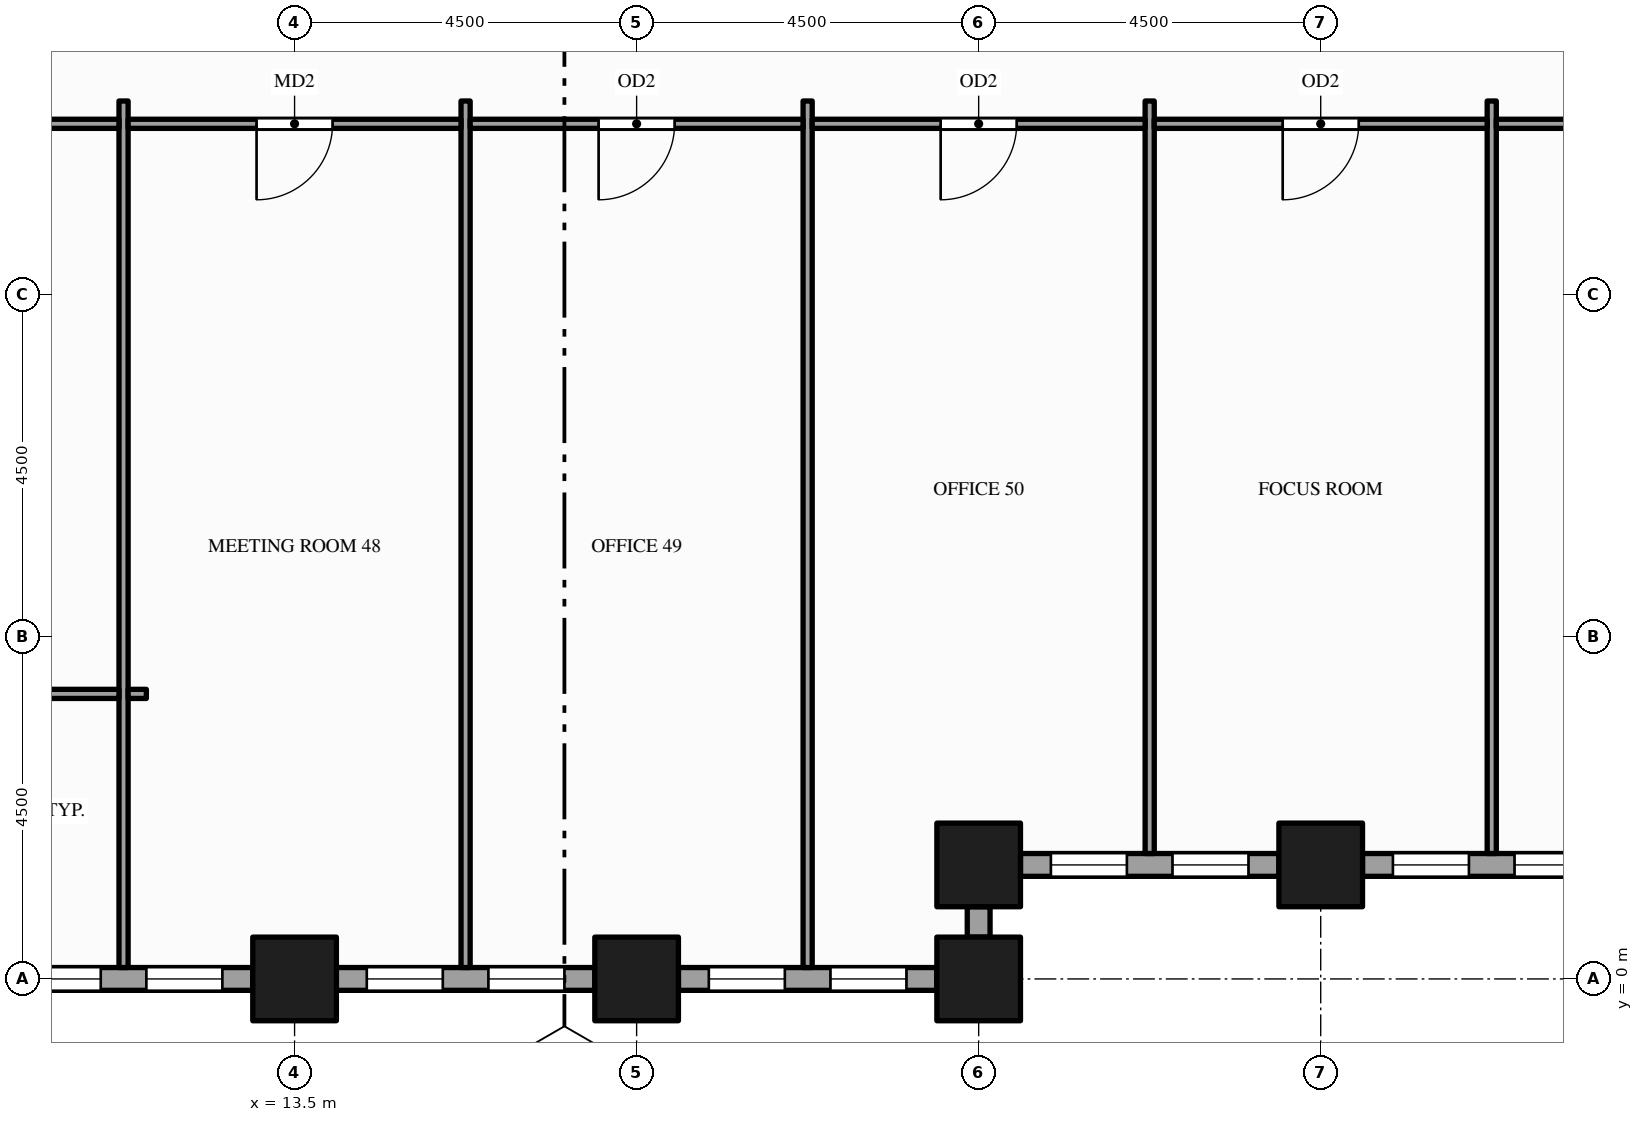
"""IFC4 building model, lengths in metres.
Left out: names, types, materials, properties, quantities, classifications, styles, units other than length and angle.
Written with IfcOpenShell. Run it as: python <this file> out.ifc"""

import sys

from ifc_helpers import new_model, si_unit, direction, frame, frame_2d, origin, origin_2d, place, context, subcontext, project, spatial, rectangle, hollow_rectangle, extrude, element, fill, save


model = new_model("IFC4")
c1 = context("Model", 3, precision=1e-05, world=origin(), true_north=direction((0.0, 1.0)))
c2 = subcontext(c1, "Body", "Model", "MODEL_VIEW")
j1 = project(units=[si_unit("LENGTHUNIT", "METRE"), si_unit("PLANEANGLEUNIT", "RADIAN")], contexts=[c1])
p1 = place(None, origin())
s1 = spatial("IfcSite", under=j1, at=p1, CompositionType="ELEMENT")
p2 = place(p1, origin())
s2 = spatial("IfcBuilding", under=s1, at=p2, CompositionType="ELEMENT")
p3 = place(p2, frame((0.0, 0.0, 41.0)))
s3 = spatial("IfcBuildingStorey", under=s2, at=p3, CompositionType="ELEMENT", Elevation=41.0)
for number, where, z_axis, x_axis in (
    (1, (13.5, 0.0, -0.15), (0.0, 0.0, 1.0), (1.0, 0.0, 0.0)),
    (2, (18.0, 0.0, -0.15), (0.0, 0.0, 1.0), (1.0, 0.0, 0.0)),
    (3, (22.5, 0.0, -0.15), (0.0, 0.0, 1.0), (1.0, 0.0, 0.0)),
    (4, (22.5, 1.5, -0.15), (0.0, 0.0, 1.0), (1.0, 0.0, 0.0)),
    (5, (27.0, 1.5, -0.15), (0.0, 0.0, 1.0), (1.0, 0.0, 0.0)),
):
    element("IfcColumn", number, at=place(p3, frame(where, z_axis=z_axis, x_axis=x_axis)), inside=s3, PredefinedType="COLUMN", context=c2, shape_type="SweptSolid", body=[
        extrude(hollow_rectangle(XDim=1.1, YDim=1.1, WallThickness=0.06, at=origin_2d()), origin(), (0.0, 0.0, 1.0), 4.0),
    ])
p4 = place(p3, frame((9.55, 0.0, 0.0), z_axis=(0.0, 0.0, 1.0), x_axis=(1.0, 0.0, 0.0)))
e6 = element("IfcWall", 6, at=p4, inside=s3, PredefinedType="STANDARD", context=c2, shape_type="SweptSolid", body=[
    extrude(rectangle(XDim=3.4, YDim=0.3, at=frame_2d((1.7, 0.0))), origin(), (0.0, 0.0, 1.0), 3.144),
])
p5 = place(p4, frame((0.4, 0.0, 0.9)))
e7 = element("IfcOpeningElement", 7, at=p5, cuts=e6, PredefinedType="OPENING", context=c2, shape_type="SweptSolid", body=[
    extrude(rectangle(XDim=1.0, YDim=2.0, at=frame_2d((0.5, 1.0))), frame((0.0, 0.16, 0.0), z_axis=(0.0, -1.0, 0.0), x_axis=(1.0, 0.0, 0.0)), (0.0, 0.0, 1.0), 0.32),
])
p6 = place(p4, frame((2.0, 0.0, 0.9)))
e8 = element("IfcOpeningElement", 8, at=p6, cuts=e6, PredefinedType="OPENING", context=c2, shape_type="SweptSolid", body=[
    extrude(rectangle(XDim=1.0, YDim=2.0, at=frame_2d((0.5, 1.0))), frame((0.0, 0.16, 0.0), z_axis=(0.0, -1.0, 0.0), x_axis=(1.0, 0.0, 0.0)), (0.0, 0.0, 1.0), 0.32),
])
p7 = place(p3, frame((14.05, 0.0, 0.0), z_axis=(0.0, 0.0, 1.0), x_axis=(1.0, 0.0, 0.0)))
e9 = element("IfcWall", 9, at=p7, inside=s3, PredefinedType="STANDARD", context=c2, shape_type="SweptSolid", body=[
    extrude(rectangle(XDim=3.4, YDim=0.3, at=frame_2d((1.7, 0.0))), origin(), (0.0, 0.0, 1.0), 3.144),
])
p8 = place(p7, frame((0.4, 0.0, 0.9)))
e10 = element("IfcOpeningElement", 10, at=p8, cuts=e9, PredefinedType="OPENING", context=c2, shape_type="SweptSolid", body=[
    extrude(rectangle(XDim=1.0, YDim=2.0, at=frame_2d((0.5, 1.0))), frame((0.0, 0.16, 0.0), z_axis=(0.0, -1.0, 0.0), x_axis=(1.0, 0.0, 0.0)), (0.0, 0.0, 1.0), 0.32),
])
p9 = place(p7, frame((2.0, 0.0, 0.9)))
e11 = element("IfcOpeningElement", 11, at=p9, cuts=e9, PredefinedType="OPENING", context=c2, shape_type="SweptSolid", body=[
    extrude(rectangle(XDim=1.0, YDim=2.0, at=frame_2d((0.5, 1.0))), frame((0.0, 0.16, 0.0), z_axis=(0.0, -1.0, 0.0), x_axis=(1.0, 0.0, 0.0)), (0.0, 0.0, 1.0), 0.32),
])
p10 = place(p3, frame((18.55, 0.0, 0.0), z_axis=(0.0, 0.0, 1.0), x_axis=(1.0, 0.0, 0.0)))
e12 = element("IfcWall", 12, at=p10, inside=s3, PredefinedType="STANDARD", context=c2, shape_type="SweptSolid", body=[
    extrude(rectangle(XDim=3.4, YDim=0.3, at=frame_2d((1.7, 0.0))), origin(), (0.0, 0.0, 1.0), 3.144),
])
p11 = place(p10, frame((0.4, 0.0, 0.9)))
e13 = element("IfcOpeningElement", 13, at=p11, cuts=e12, PredefinedType="OPENING", context=c2, shape_type="SweptSolid", body=[
    extrude(rectangle(XDim=1.0, YDim=2.0, at=frame_2d((0.5, 1.0))), frame((0.0, 0.16, 0.0), z_axis=(0.0, -1.0, 0.0), x_axis=(1.0, 0.0, 0.0)), (0.0, 0.0, 1.0), 0.32),
])
p12 = place(p10, frame((2.0, 0.0, 0.9)))
e14 = element("IfcOpeningElement", 14, at=p12, cuts=e12, PredefinedType="OPENING", context=c2, shape_type="SweptSolid", body=[
    extrude(rectangle(XDim=1.0, YDim=2.0, at=frame_2d((0.5, 1.0))), frame((0.0, 0.16, 0.0), z_axis=(0.0, -1.0, 0.0), x_axis=(1.0, 0.0, 0.0)), (0.0, 0.0, 1.0), 0.32),
])
p13 = place(p3, frame((22.5, 0.55, 0.0), z_axis=(0.0, 0.0, 1.0), x_axis=(0.0, 1.0, 0.0)))
e15 = element("IfcWall", 15, at=p13, inside=s3, PredefinedType="STANDARD", context=c2, shape_type="SweptSolid", body=[
    extrude(rectangle(XDim=0.4, YDim=0.3, at=frame_2d((0.2, 0.0))), origin(), (0.0, 0.0, 1.0), 3.144),
])
p14 = place(p3, frame((23.05, 1.5, 0.0), z_axis=(0.0, 0.0, 1.0), x_axis=(1.0, 0.0, 0.0)))
e16 = element("IfcWall", 16, at=p14, inside=s3, PredefinedType="STANDARD", context=c2, shape_type="SweptSolid", body=[
    extrude(rectangle(XDim=3.4, YDim=0.3, at=frame_2d((1.7, 0.0))), origin(), (0.0, 0.0, 1.0), 3.144),
])
p15 = place(p14, frame((0.4, 0.0, 0.9)))
e17 = element("IfcOpeningElement", 17, at=p15, cuts=e16, PredefinedType="OPENING", context=c2, shape_type="SweptSolid", body=[
    extrude(rectangle(XDim=1.0, YDim=2.0, at=frame_2d((0.5, 1.0))), frame((0.0, 0.16, 0.0), z_axis=(0.0, -1.0, 0.0), x_axis=(1.0, 0.0, 0.0)), (0.0, 0.0, 1.0), 0.32),
])
p16 = place(p14, frame((2.0, 0.0, 0.9)))
e18 = element("IfcOpeningElement", 18, at=p16, cuts=e16, PredefinedType="OPENING", context=c2, shape_type="SweptSolid", body=[
    extrude(rectangle(XDim=1.0, YDim=2.0, at=frame_2d((0.5, 1.0))), frame((0.0, 0.16, 0.0), z_axis=(0.0, -1.0, 0.0), x_axis=(1.0, 0.0, 0.0)), (0.0, 0.0, 1.0), 0.32),
])
p17 = place(p3, frame((27.55, 1.5, 0.0), z_axis=(0.0, 0.0, 1.0), x_axis=(1.0, 0.0, 0.0)))
e19 = element("IfcWall", 19, at=p17, inside=s3, PredefinedType="STANDARD", context=c2, shape_type="SweptSolid", body=[
    extrude(rectangle(XDim=3.4, YDim=0.3, at=frame_2d((1.7, 0.0))), origin(), (0.0, 0.0, 1.0), 3.144),
])
p18 = place(p17, frame((0.4, 0.0, 0.9)))
e20 = element("IfcOpeningElement", 20, at=p18, cuts=e19, PredefinedType="OPENING", context=c2, shape_type="SweptSolid", body=[
    extrude(rectangle(XDim=1.0, YDim=2.0, at=frame_2d((0.5, 1.0))), frame((0.0, 0.16, 0.0), z_axis=(0.0, -1.0, 0.0), x_axis=(1.0, 0.0, 0.0)), (0.0, 0.0, 1.0), 0.32),
])
p19 = place(p17, frame((2.0, 0.0, 0.9)))
e21 = element("IfcOpeningElement", 21, at=p19, cuts=e19, PredefinedType="OPENING", context=c2, shape_type="SweptSolid", body=[
    extrude(rectangle(XDim=1.0, YDim=2.0, at=frame_2d((0.5, 1.0))), frame((0.0, 0.16, 0.0), z_axis=(0.0, -1.0, 0.0), x_axis=(1.0, 0.0, 0.0)), (0.0, 0.0, 1.0), 0.32),
])
for number, where, z_axis, x_axis in (
    (22, (11.25, 0.15, 0.0), (0.0, 0.0, 1.0), (0.0, 1.0, 0.0)),
    (23, (15.75, 0.15, 0.0), (0.0, 0.0, 1.0), (0.0, 1.0, 0.0)),
    (24, (20.25, 0.15, 0.0), (0.0, 0.0, 1.0), (0.0, 1.0, 0.0)),
):
    element("IfcWall", number, at=place(p3, frame(where, z_axis=z_axis, x_axis=x_axis)), inside=s3, PredefinedType="PARTITIONING", context=c2, shape_type="SweptSolid", body=[
        extrude(rectangle(XDim=11.4, YDim=0.12, at=frame_2d((5.7, 0.0))), origin(), (0.0, 0.0, 1.0), 2.938),
    ])
for number, where, z_axis, x_axis in (
    (25, (24.75, 1.65, 0.0), (0.0, 0.0, 1.0), (0.0, 1.0, 0.0)),
    (26, (29.25, 1.65, 0.0), (0.0, 0.0, 1.0), (0.0, 1.0, 0.0)),
):
    element("IfcWall", number, at=place(p3, frame(where, z_axis=z_axis, x_axis=x_axis)), inside=s3, PredefinedType="PARTITIONING", context=c2, shape_type="SweptSolid", body=[
        extrude(rectangle(XDim=9.9, YDim=0.12, at=frame_2d((4.95, 0.0))), origin(), (0.0, 0.0, 1.0), 2.938),
    ])
p20 = place(p3, frame((9.125, 3.75, 0.0), z_axis=(0.0, 0.0, 1.0), x_axis=(1.0, 0.0, 0.0)))
e27 = element("IfcWall", 27, at=p20, inside=s3, PredefinedType="PARTITIONING", context=c2, shape_type="SweptSolid", body=[
    extrude(rectangle(XDim=2.065, YDim=0.12, at=frame_2d((1.032, 0.0))), origin(), (0.0, 0.0, 1.0), 2.938),
])
p21 = place(p3, frame((11.31, 3.75, 0.0), z_axis=(0.0, 0.0, 1.0), x_axis=(1.0, 0.0, 0.0)))
e28 = element("IfcWall", 28, at=p21, inside=s3, PredefinedType="PARTITIONING", context=c2, shape_type="SweptSolid", body=[
    extrude(rectangle(XDim=0.24, YDim=0.12, at=frame_2d((0.12, 0.0))), origin(), (0.0, 0.0, 1.0), 2.938),
])
p22 = place(p3, frame((0.15, 11.25, 0.0), z_axis=(0.0, 0.0, 1.0), x_axis=(1.0, 0.0, 0.0)))
e29 = element("IfcWall", 29, at=p22, inside=s3, PredefinedType="PARTITIONING", context=c2, shape_type="SweptSolid", body=[
    extrude(rectangle(XDim=11.04, YDim=0.12, at=frame_2d((5.52, 0.0))), origin(), (0.0, 0.0, 1.0), 2.938),
])
p23 = place(p22, frame((4.93, 0.0, 0.0)))
e30 = element("IfcOpeningElement", 30, at=p23, cuts=e29, PredefinedType="OPENING", context=c2, shape_type="SweptSolid", body=[
    extrude(rectangle(XDim=1.2, YDim=2.1, at=frame_2d((0.6, 1.05))), frame((0.0, 0.07, 0.0), z_axis=(0.0, -1.0, 0.0), x_axis=(1.0, 0.0, 0.0)), (0.0, 0.0, 1.0), 0.14),
])
p24 = place(p3, frame((11.31, 11.25, 0.0), z_axis=(0.0, 0.0, 1.0), x_axis=(1.0, 0.0, 0.0)))
e31 = element("IfcWall", 31, at=p24, inside=s3, PredefinedType="PARTITIONING", context=c2, shape_type="SweptSolid", body=[
    extrude(rectangle(XDim=4.38, YDim=0.12, at=frame_2d((2.19, 0.0))), origin(), (0.0, 0.0, 1.0), 2.938),
])
p25 = place(p24, frame((1.69, 0.0, 0.0)))
e32 = element("IfcOpeningElement", 32, at=p25, cuts=e31, PredefinedType="OPENING", context=c2, shape_type="SweptSolid", body=[
    extrude(rectangle(XDim=1.0, YDim=2.1, at=frame_2d((0.5, 1.05))), frame((0.0, 0.07, 0.0), z_axis=(0.0, -1.0, 0.0), x_axis=(1.0, 0.0, 0.0)), (0.0, 0.0, 1.0), 0.14),
])
p26 = place(p3, frame((15.81, 11.25, 0.0), z_axis=(0.0, 0.0, 1.0), x_axis=(1.0, 0.0, 0.0)))
e33 = element("IfcWall", 33, at=p26, inside=s3, PredefinedType="PARTITIONING", context=c2, shape_type="SweptSolid", body=[
    extrude(rectangle(XDim=4.38, YDim=0.12, at=frame_2d((2.19, 0.0))), origin(), (0.0, 0.0, 1.0), 2.938),
])
p27 = place(p26, frame((1.69, 0.0, 0.0)))
e34 = element("IfcOpeningElement", 34, at=p27, cuts=e33, PredefinedType="OPENING", context=c2, shape_type="SweptSolid", body=[
    extrude(rectangle(XDim=1.0, YDim=2.1, at=frame_2d((0.5, 1.05))), frame((0.0, 0.07, 0.0), z_axis=(0.0, -1.0, 0.0), x_axis=(1.0, 0.0, 0.0)), (0.0, 0.0, 1.0), 0.14),
])
p28 = place(p3, frame((20.31, 11.25, 0.0), z_axis=(0.0, 0.0, 1.0), x_axis=(1.0, 0.0, 0.0)))
e35 = element("IfcWall", 35, at=p28, inside=s3, PredefinedType="PARTITIONING", context=c2, shape_type="SweptSolid", body=[
    extrude(rectangle(XDim=4.38, YDim=0.12, at=frame_2d((2.19, 0.0))), origin(), (0.0, 0.0, 1.0), 2.938),
])
p29 = place(p28, frame((1.69, 0.0, 0.0)))
e36 = element("IfcOpeningElement", 36, at=p29, cuts=e35, PredefinedType="OPENING", context=c2, shape_type="SweptSolid", body=[
    extrude(rectangle(XDim=1.0, YDim=2.1, at=frame_2d((0.5, 1.05))), frame((0.0, 0.07, 0.0), z_axis=(0.0, -1.0, 0.0), x_axis=(1.0, 0.0, 0.0)), (0.0, 0.0, 1.0), 0.14),
])
p30 = place(p3, frame((24.81, 11.25, 0.0), z_axis=(0.0, 0.0, 1.0), x_axis=(1.0, 0.0, 0.0)))
e37 = element("IfcWall", 37, at=p30, inside=s3, PredefinedType="PARTITIONING", context=c2, shape_type="SweptSolid", body=[
    extrude(rectangle(XDim=4.38, YDim=0.12, at=frame_2d((2.19, 0.0))), origin(), (0.0, 0.0, 1.0), 2.938),
])
p31 = place(p30, frame((1.69, 0.0, 0.0)))
e38 = element("IfcOpeningElement", 38, at=p31, cuts=e37, PredefinedType="OPENING", context=c2, shape_type="SweptSolid", body=[
    extrude(rectangle(XDim=1.0, YDim=2.1, at=frame_2d((0.5, 1.05))), frame((0.0, 0.07, 0.0), z_axis=(0.0, -1.0, 0.0), x_axis=(1.0, 0.0, 0.0)), (0.0, 0.0, 1.0), 0.14),
])
p32 = place(p3, frame((29.31, 11.25, 0.0), z_axis=(0.0, 0.0, 1.0), x_axis=(1.0, 0.0, 0.0)))
e39 = element("IfcWall", 39, at=p32, inside=s3, PredefinedType="PARTITIONING", context=c2, shape_type="SweptSolid", body=[
    extrude(rectangle(XDim=8.88, YDim=0.12, at=frame_2d((4.44, 0.0))), origin(), (0.0, 0.0, 1.0), 2.938),
])
p33 = place(p32, frame((3.54, 0.0, 0.0)))
e40 = element("IfcOpeningElement", 40, at=p33, cuts=e39, PredefinedType="OPENING", context=c2, shape_type="SweptSolid", body=[
    extrude(rectangle(XDim=1.8, YDim=2.1, at=frame_2d((0.9, 1.05))), frame((0.0, 0.07, 0.0), z_axis=(0.0, -1.0, 0.0), x_axis=(1.0, 0.0, 0.0)), (0.0, 0.0, 1.0), 0.14),
])
p34 = place(p5, origin())
e41 = element("IfcWindow", 41, at=p34, inside=s3, PartitioningType="SINGLE_PANEL", PredefinedType="WINDOW", context=c2, shape_type="SweptSolid", body=[
    extrude(rectangle(XDim=1.0, YDim=2.0, at=frame_2d((0.5, 1.0))), frame((0.0, 0.03, 0.0), z_axis=(0.0, -1.0, 0.0), x_axis=(1.0, 0.0, 0.0)), (0.0, 0.0, 1.0), 0.06),
])
fill(e7, e41)
p35 = place(p6, origin())
e42 = element("IfcWindow", 42, at=p35, inside=s3, PartitioningType="SINGLE_PANEL", PredefinedType="WINDOW", context=c2, shape_type="SweptSolid", body=[
    extrude(rectangle(XDim=1.0, YDim=2.0, at=frame_2d((0.5, 1.0))), frame((0.0, 0.03, 0.0), z_axis=(0.0, -1.0, 0.0), x_axis=(1.0, 0.0, 0.0)), (0.0, 0.0, 1.0), 0.06),
])
fill(e8, e42)
p36 = place(p8, origin())
e43 = element("IfcWindow", 43, at=p36, inside=s3, PartitioningType="SINGLE_PANEL", PredefinedType="WINDOW", context=c2, shape_type="SweptSolid", body=[
    extrude(rectangle(XDim=1.0, YDim=2.0, at=frame_2d((0.5, 1.0))), frame((0.0, 0.03, 0.0), z_axis=(0.0, -1.0, 0.0), x_axis=(1.0, 0.0, 0.0)), (0.0, 0.0, 1.0), 0.06),
])
fill(e10, e43)
p37 = place(p9, origin())
e44 = element("IfcWindow", 44, at=p37, inside=s3, PartitioningType="SINGLE_PANEL", PredefinedType="WINDOW", context=c2, shape_type="SweptSolid", body=[
    extrude(rectangle(XDim=1.0, YDim=2.0, at=frame_2d((0.5, 1.0))), frame((0.0, 0.03, 0.0), z_axis=(0.0, -1.0, 0.0), x_axis=(1.0, 0.0, 0.0)), (0.0, 0.0, 1.0), 0.06),
])
fill(e11, e44)
p38 = place(p11, origin())
e45 = element("IfcWindow", 45, at=p38, inside=s3, PartitioningType="SINGLE_PANEL", PredefinedType="WINDOW", context=c2, shape_type="SweptSolid", body=[
    extrude(rectangle(XDim=1.0, YDim=2.0, at=frame_2d((0.5, 1.0))), frame((0.0, 0.03, 0.0), z_axis=(0.0, -1.0, 0.0), x_axis=(1.0, 0.0, 0.0)), (0.0, 0.0, 1.0), 0.06),
])
fill(e13, e45)
p39 = place(p12, origin())
e46 = element("IfcWindow", 46, at=p39, inside=s3, PartitioningType="SINGLE_PANEL", PredefinedType="WINDOW", context=c2, shape_type="SweptSolid", body=[
    extrude(rectangle(XDim=1.0, YDim=2.0, at=frame_2d((0.5, 1.0))), frame((0.0, 0.03, 0.0), z_axis=(0.0, -1.0, 0.0), x_axis=(1.0, 0.0, 0.0)), (0.0, 0.0, 1.0), 0.06),
])
fill(e14, e46)
p40 = place(p15, origin())
e47 = element("IfcWindow", 47, at=p40, inside=s3, PartitioningType="SINGLE_PANEL", PredefinedType="WINDOW", context=c2, shape_type="SweptSolid", body=[
    extrude(rectangle(XDim=1.0, YDim=2.0, at=frame_2d((0.5, 1.0))), frame((0.0, 0.03, 0.0), z_axis=(0.0, -1.0, 0.0), x_axis=(1.0, 0.0, 0.0)), (0.0, 0.0, 1.0), 0.06),
])
fill(e17, e47)
p41 = place(p16, origin())
e48 = element("IfcWindow", 48, at=p41, inside=s3, PartitioningType="SINGLE_PANEL", PredefinedType="WINDOW", context=c2, shape_type="SweptSolid", body=[
    extrude(rectangle(XDim=1.0, YDim=2.0, at=frame_2d((0.5, 1.0))), frame((0.0, 0.03, 0.0), z_axis=(0.0, -1.0, 0.0), x_axis=(1.0, 0.0, 0.0)), (0.0, 0.0, 1.0), 0.06),
])
fill(e18, e48)
p42 = place(p18, origin())
e49 = element("IfcWindow", 49, at=p42, inside=s3, PartitioningType="SINGLE_PANEL", PredefinedType="WINDOW", context=c2, shape_type="SweptSolid", body=[
    extrude(rectangle(XDim=1.0, YDim=2.0, at=frame_2d((0.5, 1.0))), frame((0.0, 0.03, 0.0), z_axis=(0.0, -1.0, 0.0), x_axis=(1.0, 0.0, 0.0)), (0.0, 0.0, 1.0), 0.06),
])
fill(e20, e49)
p43 = place(p19, origin())
e50 = element("IfcWindow", 50, at=p43, inside=s3, PartitioningType="SINGLE_PANEL", PredefinedType="WINDOW", context=c2, shape_type="SweptSolid", body=[
    extrude(rectangle(XDim=1.0, YDim=2.0, at=frame_2d((0.5, 1.0))), frame((0.0, 0.03, 0.0), z_axis=(0.0, -1.0, 0.0), x_axis=(1.0, 0.0, 0.0)), (0.0, 0.0, 1.0), 0.06),
])
fill(e21, e50)
p44 = place(p25, origin())
e51 = element("IfcDoor", 51, at=p44, inside=s3, OperationType="SINGLE_SWING_LEFT", PredefinedType="DOOR", context=c2, shape_type="SweptSolid", body=[
    extrude(rectangle(XDim=1.0, YDim=2.1, at=frame_2d((0.5, 1.05))), frame((0.0, 0.025, 0.0), z_axis=(0.0, -1.0, 0.0), x_axis=(1.0, 0.0, 0.0)), (0.0, 0.0, 1.0), 0.05),
])
fill(e32, e51)
p45 = place(p27, origin())
e52 = element("IfcDoor", 52, at=p45, inside=s3, OperationType="SINGLE_SWING_LEFT", PredefinedType="DOOR", context=c2, shape_type="SweptSolid", body=[
    extrude(rectangle(XDim=1.0, YDim=2.1, at=frame_2d((0.5, 1.05))), frame((0.0, 0.025, 0.0), z_axis=(0.0, -1.0, 0.0), x_axis=(1.0, 0.0, 0.0)), (0.0, 0.0, 1.0), 0.05),
])
fill(e34, e52)
p46 = place(p29, origin())
e53 = element("IfcDoor", 53, at=p46, inside=s3, OperationType="SINGLE_SWING_LEFT", PredefinedType="DOOR", context=c2, shape_type="SweptSolid", body=[
    extrude(rectangle(XDim=1.0, YDim=2.1, at=frame_2d((0.5, 1.05))), frame((0.0, 0.025, 0.0), z_axis=(0.0, -1.0, 0.0), x_axis=(1.0, 0.0, 0.0)), (0.0, 0.0, 1.0), 0.05),
])
fill(e36, e53)
p47 = place(p31, origin())
e54 = element("IfcDoor", 54, at=p47, inside=s3, OperationType="SINGLE_SWING_LEFT", PredefinedType="DOOR", context=c2, shape_type="SweptSolid", body=[
    extrude(rectangle(XDim=1.0, YDim=2.1, at=frame_2d((0.5, 1.05))), frame((0.0, 0.025, 0.0), z_axis=(0.0, -1.0, 0.0), x_axis=(1.0, 0.0, 0.0)), (0.0, 0.0, 1.0), 0.05),
])
fill(e38, e54)
save(model, sys.argv[1])
